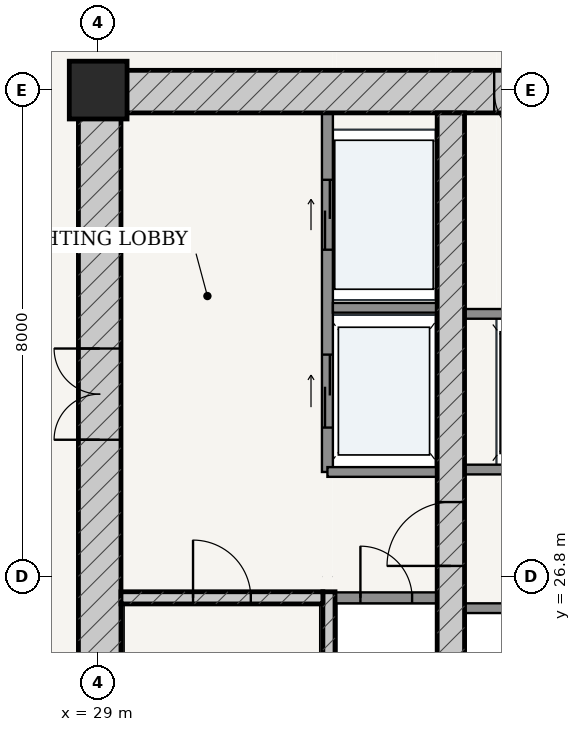
"""IFC4 building model, lengths in metres.
Left out: names, types, materials, properties, quantities, classifications, styles, units other than length and angle.
Written with IfcOpenShell. Run it as: python <this file> out.ifc"""

import sys

from ifc_helpers import new_model, si_unit, direction, frame, frame_2d, origin, origin_2d, place, context, subcontext, project, spatial, rectangle, extrude, source, transform, mapped, element, fill, save


model = new_model("IFC4")
c1 = context("Model", 3, precision=1e-05, world=origin(), true_north=direction((-0.2419218956, 0.970295726276)))
c2 = subcontext(c1, "Body", "Model", "MODEL_VIEW")
j1 = project(units=[si_unit("LENGTHUNIT", "METRE"), si_unit("PLANEANGLEUNIT", "RADIAN")], contexts=[c1])
p1 = place(None, origin())
s1 = spatial("IfcSite", under=j1, at=p1, CompositionType="ELEMENT")
p2 = place(p1, origin())
s2 = spatial("IfcBuilding", under=s1, at=p2, CompositionType="ELEMENT")
p3 = place(p2, frame((0.0, 0.0, 115.8)))
s3 = spatial("IfcBuildingStorey", under=s2, at=p3, CompositionType="ELEMENT", Elevation=115.8)
p4 = place(p3, frame((29.0, 34.8, 0.0), z_axis=(0.0, 0.0, 1.0), x_axis=(1.0, 0.0, 0.0)))
e1 = element("IfcColumn", 1, at=p4, inside=s3, PredefinedType="COLUMN", context=c2, shape_type="SweptSolid", body=[
    extrude(rectangle(XDim=0.95, YDim=0.95, at=origin_2d()), origin(), (0.0, 0.0, 1.0), 3.6),
])
p5 = place(p3, frame((28.675, 34.775, 0.0), z_axis=(0.0, 0.0, 1.0), x_axis=(1.0, 0.0, 0.0)))
e2 = element("IfcWall", 2, at=p5, inside=s3, PredefinedType="SHEAR", context=c2, shape_type="SweptSolid", body=[
    extrude(rectangle(XDim=18.65, YDim=0.7, at=frame_2d((9.325, 0.0))), origin(), (0.0, 0.0, 1.0), 3.325),
])
p6 = place(p5, frame((6.837, 0.0, 0.0)))
e3 = element("IfcOpeningElement", 3, at=p6, cuts=e2, PredefinedType="OPENING", context=c2, shape_type="SweptSolid", body=[
    extrude(rectangle(XDim=0.85, YDim=2.1, at=frame_2d((0.425, 1.05))), frame((0.0, 0.36, 0.0), z_axis=(0.0, -1.0, 0.0), x_axis=(1.0, 0.0, 0.0)), (0.0, 0.0, 1.0), 0.72),
])
p7 = place(p5, frame((8.895, 0.0, 0.0)))
e4 = element("IfcOpeningElement", 4, at=p7, cuts=e2, PredefinedType="OPENING", context=c2, shape_type="SweptSolid", body=[
    extrude(rectangle(XDim=0.86, YDim=2.1, at=frame_2d((0.43, 1.05))), frame((0.0, 0.36, 0.0), z_axis=(0.0, -1.0, 0.0), x_axis=(1.0, 0.0, 0.0)), (0.0, 0.0, 1.0), 0.72),
])
p8 = place(p5, frame((10.962, 0.0, 0.0)))
e5 = element("IfcOpeningElement", 5, at=p8, cuts=e2, PredefinedType="OPENING", context=c2, shape_type="SweptSolid", body=[
    extrude(rectangle(XDim=0.85, YDim=2.1, at=frame_2d((0.425, 1.05))), frame((0.0, 0.36, 0.0), z_axis=(0.0, -1.0, 0.0), x_axis=(1.0, 0.0, 0.0)), (0.0, 0.0, 1.0), 0.72),
])
p9 = place(p3, frame((29.025, 19.175, 0.0), z_axis=(0.0, 0.0, 1.0), x_axis=(0.0, 1.0, 0.0)))
e6 = element("IfcWall", 6, at=p9, inside=s3, PredefinedType="SHEAR", context=c2, shape_type="SweptSolid", body=[
    extrude(rectangle(XDim=15.25, YDim=0.7, at=frame_2d((7.625, 0.0))), origin(), (0.0, 0.0, 1.0), 3.325),
])
p10 = place(p9, frame((9.875, 0.0, 0.0)))
e7 = element("IfcOpeningElement", 7, at=p10, cuts=e6, PredefinedType="OPENING", context=c2, shape_type="SweptSolid", body=[
    extrude(rectangle(XDim=1.5, YDim=2.2, at=frame_2d((0.75, 1.1))), frame((0.0, 0.36, 0.0), z_axis=(0.0, -1.0, 0.0), x_axis=(1.0, 0.0, 0.0)), (0.0, 0.0, 1.0), 0.72),
])
p11 = place(p3, frame((32.795, 19.175, 0.0), z_axis=(0.0, 0.0, 1.0), x_axis=(0.0, 1.0, 0.0)))
e8 = element("IfcWall", 8, at=p11, inside=s3, PredefinedType="SOLIDWALL", context=c2, shape_type="SweptSolid", body=[
    extrude(rectangle(XDim=7.375, YDim=0.2, at=frame_2d((3.688, 0.0))), origin(), (0.0, 0.0, 1.0), 3.325),
])
p12 = place(p3, frame((29.375, 26.45, 0.0), z_axis=(0.0, 0.0, 1.0), x_axis=(1.0, 0.0, 0.0)))
e9 = element("IfcWall", 9, at=p12, inside=s3, PredefinedType="SOLIDWALL", context=c2, shape_type="SweptSolid", body=[
    extrude(rectangle(XDim=3.32, YDim=0.2, at=frame_2d((1.66, 0.0))), origin(), (0.0, 0.0, 1.0), 3.325),
])
p13 = place(p12, frame((1.185, 0.0, 0.0)))
e10 = element("IfcOpeningElement", 10, at=p13, cuts=e9, PredefinedType="OPENING", context=c2, shape_type="SweptSolid", body=[
    extrude(rectangle(XDim=0.95, YDim=2.15, at=frame_2d((0.475, 1.075))), frame((0.0, 0.11, 0.0), z_axis=(0.0, -1.0, 0.0), x_axis=(1.0, 0.0, 0.0)), (0.0, 0.0, 1.0), 0.22),
])
p14 = place(p3, frame((34.8, 19.175, 0.0), z_axis=(0.0, 0.0, 1.0), x_axis=(0.0, 1.0, 0.0)))
e11 = element("IfcWall", 11, at=p14, inside=s3, PredefinedType="SHEAR", context=c2, shape_type="SweptSolid", body=[
    extrude(rectangle(XDim=15.25, YDim=0.45, at=frame_2d((7.625, 0.0))), origin(), (0.0, 0.0, 1.0), 3.325),
])
p15 = place(p14, frame((7.8, 0.0, 0.0)))
e12 = element("IfcOpeningElement", 12, at=p15, cuts=e11, PredefinedType="OPENING", context=c2, shape_type="SweptSolid", body=[
    extrude(rectangle(XDim=1.05, YDim=2.15, at=frame_2d((0.525, 1.075))), frame((0.0, 0.235, 0.0), z_axis=(0.0, -1.0, 0.0), x_axis=(1.0, 0.0, 0.0)), (0.0, 0.0, 1.0), 0.47),
])
p16 = place(p3, frame((32.9, 26.45, 0.0), z_axis=(0.0, 0.0, 1.0), x_axis=(1.0, 0.0, 0.0)))
e13 = element("IfcWall", 13, at=p16, inside=s3, PredefinedType="PARTITIONING", context=c2, shape_type="SweptSolid", body=[
    extrude(rectangle(XDim=1.675, YDim=0.18, at=frame_2d((0.837, 0.0))), origin(), (0.0, 0.0, 1.0), 3.325),
])
p17 = place(p16, frame((0.413, 0.0, 0.0)))
e14 = element("IfcOpeningElement", 14, at=p17, cuts=e13, PredefinedType="OPENING", context=c2, shape_type="SweptSolid", body=[
    extrude(rectangle(XDim=0.85, YDim=2.1, at=frame_2d((0.425, 1.05))), frame((0.0, 0.1, 0.0), z_axis=(0.0, -1.0, 0.0), x_axis=(1.0, 0.0, 0.0)), (0.0, 0.0, 1.0), 0.2),
])
p18 = place(p3, frame((32.77, 28.52, 0.0), z_axis=(0.0, 0.0, 1.0), x_axis=(0.0, 1.0, 0.0)))
e15 = element("IfcWall", 15, at=p18, inside=s3, PredefinedType="PARTITIONING", context=c2, shape_type="SweptSolid", body=[
    extrude(rectangle(XDim=5.905, YDim=0.18, at=frame_2d((2.953, 0.0))), origin(), (0.0, 0.0, 1.0), 3.325),
])
p19 = place(p18, frame((3.655, 0.0, 0.0)))
e16 = element("IfcOpeningElement", 16, at=p19, cuts=e15, PredefinedType="OPENING", context=c2, shape_type="SweptSolid", body=[
    extrude(rectangle(XDim=1.15, YDim=2.2, at=frame_2d((0.575, 1.1))), frame((0.0, 0.1, 0.0), z_axis=(0.0, -1.0, 0.0), x_axis=(1.0, 0.0, 0.0)), (0.0, 0.0, 1.0), 0.2),
])
p20 = place(p18, frame((0.73, 0.0, 0.0)))
e17 = element("IfcOpeningElement", 17, at=p20, cuts=e15, PredefinedType="OPENING", context=c2, shape_type="SweptSolid", body=[
    extrude(rectangle(XDim=1.2, YDim=2.25, at=frame_2d((0.6, 1.125))), frame((0.0, 0.1, 0.0), z_axis=(0.0, -1.0, 0.0), x_axis=(1.0, 0.0, 0.0)), (0.0, 0.0, 1.0), 0.2),
])
p21 = place(p3, frame((32.86, 31.22, 0.0), z_axis=(0.0, 0.0, 1.0), x_axis=(1.0, 0.0, 0.0)))
e18 = element("IfcWall", 18, at=p21, inside=s3, PredefinedType="PARTITIONING", context=c2, shape_type="SweptSolid", body=[
    extrude(rectangle(XDim=1.715, YDim=0.16, at=frame_2d((0.857, 0.0))), origin(), (0.0, 0.0, 1.0), 3.325),
])
p22 = place(p3, frame((32.77, 28.52, 0.0), z_axis=(0.0, 0.0, 1.0), x_axis=(1.0, 0.0, 0.0)))
e19 = element("IfcWall", 19, at=p22, inside=s3, PredefinedType="PARTITIONING", context=c2, shape_type="SweptSolid", body=[
    extrude(rectangle(XDim=1.805, YDim=0.16, at=frame_2d((0.902, 0.0))), origin(), (0.0, 0.0, 1.0), 3.325),
])
p23 = place(p3, frame((35.025, 28.56, 0.0), z_axis=(0.0, 0.0, 1.0), x_axis=(1.0, 0.0, 0.0)))
e20 = element("IfcWall", 20, at=p23, inside=s3, PredefinedType="PARTITIONING", context=c2, shape_type="SweptSolid", body=[
    extrude(rectangle(XDim=5.95, YDim=0.16, at=frame_2d((2.975, 0.0))), origin(), (0.0, 0.0, 1.0), 3.325),
])
p24 = place(p23, frame((0.76, 0.0, 0.0)))
e21 = element("IfcOpeningElement", 21, at=p24, cuts=e20, PredefinedType="OPENING", context=c2, shape_type="SweptSolid", body=[
    extrude(rectangle(XDim=1.1, YDim=2.2, at=frame_2d((0.55, 1.1))), frame((0.0, 0.09, 0.0), z_axis=(0.0, -1.0, 0.0), x_axis=(1.0, 0.0, 0.0)), (0.0, 0.0, 1.0), 0.18),
])
p25 = place(p23, frame((2.425, 0.0, 0.0)))
e22 = element("IfcOpeningElement", 22, at=p25, cuts=e20, PredefinedType="OPENING", context=c2, shape_type="SweptSolid", body=[
    extrude(rectangle(XDim=1.1, YDim=2.2, at=frame_2d((0.55, 1.1))), frame((0.0, 0.09, 0.0), z_axis=(0.0, -1.0, 0.0), x_axis=(1.0, 0.0, 0.0)), (0.0, 0.0, 1.0), 0.18),
])
p26 = place(p23, frame((4.09, 0.0, 0.0)))
e23 = element("IfcOpeningElement", 23, at=p26, cuts=e20, PredefinedType="OPENING", context=c2, shape_type="SweptSolid", body=[
    extrude(rectangle(XDim=1.1, YDim=2.2, at=frame_2d((0.55, 1.1))), frame((0.0, 0.09, 0.0), z_axis=(0.0, -1.0, 0.0), x_axis=(1.0, 0.0, 0.0)), (0.0, 0.0, 1.0), 0.18),
])
for number, where, z_axis, x_axis in (
    (24, (35.025, 31.12, 0.0), (0.0, 0.0, 1.0), (1.0, 0.0, 0.0)),
    (25, (35.025, 26.28, 0.0), (0.0, 0.0, 1.0), (1.0, 0.0, 0.0)),
):
    element("IfcWall", number, at=place(p3, frame(where, z_axis=z_axis, x_axis=x_axis)), inside=s3, PredefinedType="PARTITIONING", context=c2, shape_type="SweptSolid", body=[
        extrude(rectangle(XDim=5.95, YDim=0.16, at=frame_2d((2.975, 0.0))), origin(), (0.0, 0.0, 1.0), 3.325),
    ])
m1 = source(origin(), c2, "Body", "SweptSolid", [
    extrude(rectangle(XDim=1.5, YDim=2.2, at=frame_2d((0.75, 1.1))), frame((0.0, 0.025, 0.0), z_axis=(0.0, -1.0, 0.0), x_axis=(1.0, 0.0, 0.0)), (0.0, 0.0, 1.0), 0.05),
])
p27 = place(p10, origin())
e26 = element("IfcDoor", 26, at=p27, inside=s3, OperationType="DOUBLE_DOOR_SINGLE_SWING", PredefinedType="DOOR", context=c2, shape_type="MappedRepresentation", body=[
    mapped(m1, transform((0.0, 0.0, 0.0), scale=1.0)),
])
fill(e7, e26)
m2 = source(origin(), c2, "Body", "SweptSolid", [
    extrude(rectangle(XDim=1.05, YDim=2.15, at=frame_2d((0.525, 1.075))), frame((0.0, 0.025, 0.0), z_axis=(0.0, -1.0, 0.0), x_axis=(1.0, 0.0, 0.0)), (0.0, 0.0, 1.0), 0.05),
])
p28 = place(p15, origin())
e27 = element("IfcDoor", 27, at=p28, inside=s3, OperationType="SINGLE_SWING_LEFT", PredefinedType="DOOR", context=c2, shape_type="MappedRepresentation", body=[
    mapped(m2, transform((0.0, 0.0, 0.0), scale=1.0)),
])
fill(e12, e27)
m3 = source(origin(), c2, "Body", "SweptSolid", [
    extrude(rectangle(XDim=0.95, YDim=2.15, at=frame_2d((0.475, 1.075))), frame((0.0, 0.025, 0.0), z_axis=(0.0, -1.0, 0.0), x_axis=(1.0, 0.0, 0.0)), (0.0, 0.0, 1.0), 0.05),
])
p29 = place(p13, origin())
e28 = element("IfcDoor", 28, at=p29, inside=s3, OperationType="SINGLE_SWING_LEFT", PredefinedType="DOOR", context=c2, shape_type="MappedRepresentation", body=[
    mapped(m3, transform((0.0, 0.0, 0.0), scale=1.0)),
])
fill(e10, e28)
m4 = source(origin(), c2, "Body", "SweptSolid", [
    extrude(rectangle(XDim=0.85, YDim=2.1, at=frame_2d((0.425, 1.05))), frame((0.0, 0.025, 0.0), z_axis=(0.0, -1.0, 0.0), x_axis=(1.0, 0.0, 0.0)), (0.0, 0.0, 1.0), 0.05),
])
p30 = place(p17, origin())
e29 = element("IfcDoor", 29, at=p30, inside=s3, OperationType="SINGLE_SWING_LEFT", PredefinedType="DOOR", context=c2, shape_type="MappedRepresentation", body=[
    mapped(m4, transform((0.0, 0.0, 0.0), scale=1.0)),
])
fill(e14, e29)
p31 = place(p6, frame((0.85, 0.0, 0.0), z_axis=(0.0, 0.0, 1.0), x_axis=(-1.0, 0.0, 0.0)))
e30 = element("IfcDoor", 30, at=p31, inside=s3, OperationType="SINGLE_SWING_LEFT", PredefinedType="DOOR", context=c2, shape_type="MappedRepresentation", body=[
    mapped(m4, transform((0.0, 0.0, 0.0), scale=1.0)),
])
fill(e3, e30)
m5 = source(origin(), c2, "Body", "SweptSolid", [
    extrude(rectangle(XDim=1.15, YDim=2.2, at=frame_2d((0.575, 1.1))), frame((0.0, 0.025, 0.0), z_axis=(0.0, -1.0, 0.0), x_axis=(1.0, 0.0, 0.0)), (0.0, 0.0, 1.0), 0.05),
])
p32 = place(p19, origin())
e31 = element("IfcDoor", 31, at=p32, inside=s3, OperationType="DOUBLE_DOOR_SLIDING", PredefinedType="DOOR", context=c2, shape_type="MappedRepresentation", body=[
    mapped(m5, transform((0.0, 0.0, 0.0), scale=1.0)),
])
fill(e16, e31)
m6 = source(origin(), c2, "Body", "SweptSolid", [
    extrude(rectangle(XDim=1.2, YDim=2.25, at=frame_2d((0.6, 1.125))), frame((0.0, 0.025, 0.0), z_axis=(0.0, -1.0, 0.0), x_axis=(1.0, 0.0, 0.0)), (0.0, 0.0, 1.0), 0.05),
])
p33 = place(p20, origin())
e32 = element("IfcDoor", 32, at=p33, inside=s3, OperationType="DOUBLE_DOOR_SLIDING", PredefinedType="DOOR", context=c2, shape_type="MappedRepresentation", body=[
    mapped(m6, transform((0.0, 0.0, 0.0), scale=1.0)),
])
fill(e17, e32)
save(model, sys.argv[1])
